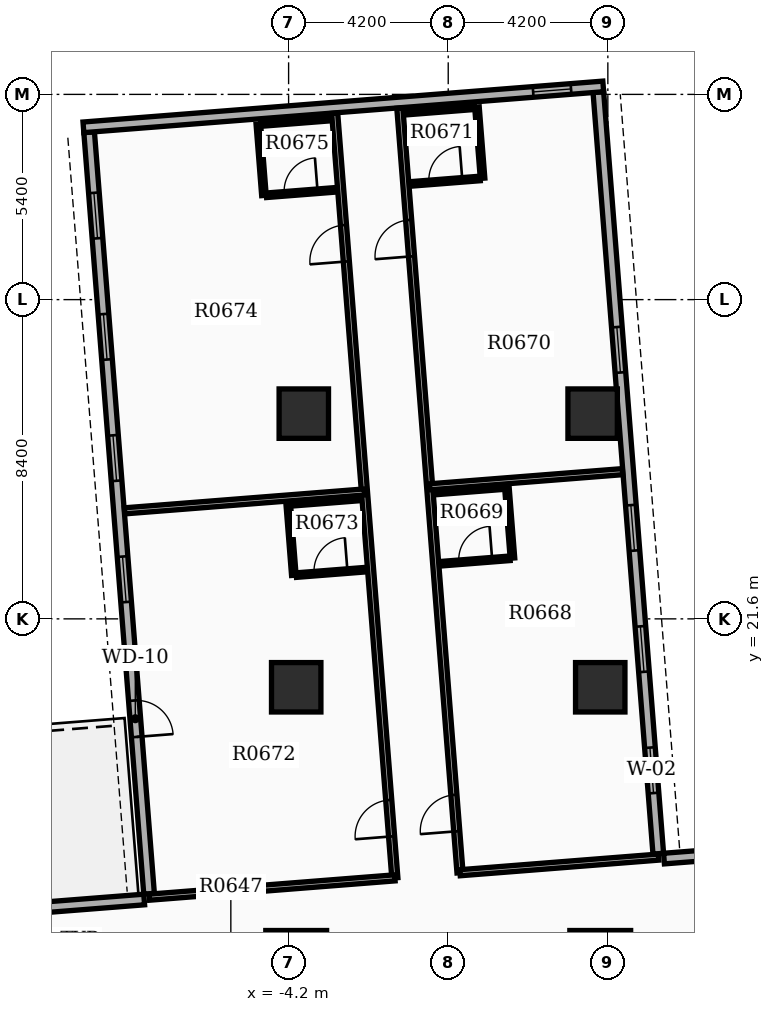
"""IFC4 building model, lengths in metres.
Left out: names, types, materials, properties, quantities, classifications, styles, units other than length and angle.
Written with IfcOpenShell. Run it as: python <this file> out.ifc"""

import sys

from ifc_helpers import new_model, si_unit, direction, frame, frame_2d, origin, origin_2d, place, context, subcontext, project, spatial, rectangle, extrude, element, fill, save


model = new_model("IFC4")
c1 = context("Model", 3, precision=1e-05, world=origin(), true_north=direction((0.0, 1.0)))
c2 = subcontext(c1, "Body", "Model", "MODEL_VIEW")
j1 = project(units=[si_unit("LENGTHUNIT", "METRE"), si_unit("PLANEANGLEUNIT", "RADIAN")], contexts=[c1])
p1 = place(None, origin())
s1 = spatial("IfcSite", under=j1, at=p1, CompositionType="ELEMENT")
p2 = place(p1, origin())
s2 = spatial("IfcBuilding", under=s1, at=p2, CompositionType="ELEMENT")
p3 = place(p2, frame((0.0, 0.0, 43.2)))
s3 = spatial("IfcBuildingStorey", under=s2, at=p3, CompositionType="ELEMENT", Elevation=43.2)
for number, where, z_axis, x_axis in (
    (1, (4.0, 12.6, 0.0), (0.0, 0.0, 1.0), (1.0, 0.0, 0.0)),
    (2, (-4.0, 12.6, 0.0), (0.0, 0.0, 1.0), (1.0, 0.0, 0.0)),
):
    element("IfcColumn", number, at=place(p3, frame(where, z_axis=z_axis, x_axis=x_axis)), inside=s3, PredefinedType="COLUMN", context=c2, shape_type="SweptSolid", body=[
        extrude(rectangle(XDim=1.6, YDim=1.6, at=origin_2d()), origin(), (0.0, 0.0, 1.0), 3.9),
    ])
for number, where, z_axis, x_axis in (
    (3, (-4.0, 19.8, 0.0), (0.0, 0.0, 1.0), (1.0, 0.0, 0.0)),
    (4, (4.0, 19.8, 0.0), (0.0, 0.0, 1.0), (1.0, 0.0, 0.0)),
    (5, (-3.8, 27.0, 0.0), (0.0, 0.0, 1.0), (1.0, 0.0, 0.0)),
    (6, (3.8, 27.0, 0.0), (0.0, 0.0, 1.0), (1.0, 0.0, 0.0)),
):
    element("IfcColumn", number, at=place(p3, frame(where, z_axis=z_axis, x_axis=x_axis)), inside=s3, PredefinedType="COLUMN", context=c2, shape_type="SweptSolid", body=[
        extrude(rectangle(XDim=1.3, YDim=1.3, at=origin_2d()), origin(), (0.0, 0.0, 1.0), 3.9),
    ])
p4 = place(p3, frame((5.527, 15.421, 0.0), z_axis=(0.0, 0.0, 1.0), x_axis=(-0.078452802979, 0.996917828963, 0.0)))
e7 = element("IfcWall", 7, at=p4, inside=s3, PredefinedType="STANDARD", context=c2, shape_type="SweptSolid", body=[
    extrude(rectangle(XDim=20.1, YDim=0.28, at=frame_2d((10.05, 0.0))), origin(), (0.0, 0.0, 1.0), 2.86),
])
p5 = place(p4, frame((1.6, 0.0, 0.8)))
e8 = element("IfcOpeningElement", 8, at=p5, cuts=e7, PredefinedType="OPENING", context=c2, shape_type="SweptSolid", body=[
    extrude(rectangle(XDim=1.2, YDim=1.6, at=frame_2d((0.6, 0.8))), frame((0.0, 0.15, 0.0), z_axis=(0.0, -1.0, 0.0), x_axis=(1.0, 0.0, 0.0)), (0.0, 0.0, 1.0), 0.3),
])
p6 = place(p4, frame((4.8, 0.0, 0.8)))
e9 = element("IfcOpeningElement", 9, at=p6, cuts=e7, PredefinedType="OPENING", context=c2, shape_type="SweptSolid", body=[
    extrude(rectangle(XDim=1.2, YDim=1.6, at=frame_2d((0.6, 0.8))), frame((0.0, 0.15, 0.0), z_axis=(0.0, -1.0, 0.0), x_axis=(1.0, 0.0, 0.0)), (0.0, 0.0, 1.0), 0.3),
])
p7 = place(p4, frame((8.0, 0.0, 0.8)))
e10 = element("IfcOpeningElement", 10, at=p7, cuts=e7, PredefinedType="OPENING", context=c2, shape_type="SweptSolid", body=[
    extrude(rectangle(XDim=1.2, YDim=1.6, at=frame_2d((0.6, 0.8))), frame((0.0, 0.15, 0.0), z_axis=(0.0, -1.0, 0.0), x_axis=(1.0, 0.0, 0.0)), (0.0, 0.0, 1.0), 0.3),
])
p8 = place(p4, frame((12.7, 0.0, 0.8)))
e11 = element("IfcOpeningElement", 11, at=p8, cuts=e7, PredefinedType="OPENING", context=c2, shape_type="SweptSolid", body=[
    extrude(rectangle(XDim=1.2, YDim=1.6, at=frame_2d((0.6, 0.8))), frame((0.0, 0.15, 0.0), z_axis=(0.0, -1.0, 0.0), x_axis=(1.0, 0.0, 0.0)), (0.0, 0.0, 1.0), 0.3),
])
p9 = place(p3, frame((-9.448, 34.405, 0.0), z_axis=(0.0, 0.0, 1.0), x_axis=(0.078452802979, -0.996917828963, 0.0)))
e12 = element("IfcWall", 12, at=p9, inside=s3, PredefinedType="STANDARD", context=c2, shape_type="SweptSolid", body=[
    extrude(rectangle(XDim=20.1, YDim=0.28, at=frame_2d((10.05, 0.0))), origin(), (0.0, 0.0, 1.0), 2.86),
])
p10 = place(p9, frame((1.6, 0.0, 0.8)))
e13 = element("IfcOpeningElement", 13, at=p10, cuts=e12, PredefinedType="OPENING", context=c2, shape_type="SweptSolid", body=[
    extrude(rectangle(XDim=1.2, YDim=1.6, at=frame_2d((0.6, 0.8))), frame((0.0, 0.15, 0.0), z_axis=(0.0, -1.0, 0.0), x_axis=(1.0, 0.0, 0.0)), (0.0, 0.0, 1.0), 0.3),
])
p11 = place(p9, frame((4.8, 0.0, 0.8)))
e14 = element("IfcOpeningElement", 14, at=p11, cuts=e12, PredefinedType="OPENING", context=c2, shape_type="SweptSolid", body=[
    extrude(rectangle(XDim=1.2, YDim=1.6, at=frame_2d((0.6, 0.8))), frame((0.0, 0.15, 0.0), z_axis=(0.0, -1.0, 0.0), x_axis=(1.0, 0.0, 0.0)), (0.0, 0.0, 1.0), 0.3),
])
p12 = place(p9, frame((8.0, 0.0, 0.8)))
e15 = element("IfcOpeningElement", 15, at=p12, cuts=e12, PredefinedType="OPENING", context=c2, shape_type="SweptSolid", body=[
    extrude(rectangle(XDim=1.2, YDim=1.6, at=frame_2d((0.6, 0.8))), frame((0.0, 0.15, 0.0), z_axis=(0.0, -1.0, 0.0), x_axis=(1.0, 0.0, 0.0)), (0.0, 0.0, 1.0), 0.3),
])
p13 = place(p9, frame((11.2, 0.0, 0.8)))
e16 = element("IfcOpeningElement", 16, at=p13, cuts=e12, PredefinedType="OPENING", context=c2, shape_type="SweptSolid", body=[
    extrude(rectangle(XDim=1.2, YDim=1.6, at=frame_2d((0.6, 0.8))), frame((0.0, 0.15, 0.0), z_axis=(0.0, -1.0, 0.0), x_axis=(1.0, 0.0, 0.0)), (0.0, 0.0, 1.0), 0.3),
])
p14 = place(p9, frame((15.0, 0.0, 0.0)))
e17 = element("IfcOpeningElement", 17, at=p14, cuts=e12, PredefinedType="OPENING", context=c2, shape_type="SweptSolid", body=[
    extrude(rectangle(XDim=0.96, YDim=2.1, at=frame_2d((0.48, 1.05))), frame((0.0, 0.15, 0.0), z_axis=(0.0, -1.0, 0.0), x_axis=(1.0, 0.0, 0.0)), (0.0, 0.0, 1.0), 0.3),
])
p15 = place(p3, frame((4.079, 35.61, 0.0), z_axis=(0.0, 0.0, 1.0), x_axis=(-0.996916198482, -0.078473519122, 0.0)))
e18 = element("IfcWall", 18, at=p15, inside=s3, PredefinedType="STANDARD", context=c2, shape_type="SweptSolid", body=[
    extrude(rectangle(XDim=13.72, YDim=0.28, at=frame_2d((6.86, 0.0))), origin(), (0.0, 0.0, 1.0), 2.86),
])
p16 = place(p15, frame((0.85, 0.0, 0.85)))
e19 = element("IfcOpeningElement", 19, at=p16, cuts=e18, PredefinedType="OPENING", context=c2, shape_type="SweptSolid", body=[
    extrude(rectangle(XDim=1.0, YDim=1.5, at=frame_2d((0.5, 0.75))), frame((0.0, 0.15, 0.0), z_axis=(0.0, -1.0, 0.0), x_axis=(1.0, 0.0, 0.0)), (0.0, 0.0, 1.0), 0.3),
])
p17 = place(p3, frame((11.958, 15.787, 0.0), z_axis=(0.0, 0.0, 1.0), x_axis=(-0.996916125428, -0.078474447191, 0.0)))
e20 = element("IfcWall", 20, at=p17, inside=s3, PredefinedType="STANDARD", context=c2, shape_type="SweptSolid", body=[
    extrude(rectangle(XDim=6.3, YDim=0.28, at=frame_2d((3.15, 0.0))), origin(), (0.0, 0.0, 1.0), 2.86),
])
p18 = place(p3, frame((-14.281, 13.722, 0.0), z_axis=(0.0, 0.0, 1.0), x_axis=(0.99691915642, 0.078435932851, 0.0)))
e21 = element("IfcWall", 21, at=p18, inside=s3, PredefinedType="STANDARD", context=c2, shape_type="SweptSolid", body=[
    extrude(rectangle(XDim=6.3, YDim=0.28, at=frame_2d((3.15, 0.0))), origin(), (0.0, 0.0, 1.0), 2.86),
])
p19 = place(p3, frame((0.31, 14.92, 0.0), z_axis=(0.0, 0.0, 1.0), x_axis=(-0.078461408156, 0.996917151738, 0.0)))
e22 = element("IfcWall", 22, at=p19, inside=s3, PredefinedType="PARTITIONING", context=c2, shape_type="SweptSolid", body=[
    extrude(rectangle(XDim=20.182, YDim=0.16, at=frame_2d((10.091, 0.0))), origin(), (0.0, 0.0, 1.0), 2.85),
])
p20 = place(p19, frame((1.094, 0.0, 0.0)))
e23 = element("IfcOpeningElement", 23, at=p20, cuts=e22, PredefinedType="OPENING", context=c2, shape_type="SweptSolid", body=[
    extrude(rectangle(XDim=0.96, YDim=2.15, at=frame_2d((0.48, 1.075))), frame((0.0, 0.09, 0.0), z_axis=(0.0, -1.0, 0.0), x_axis=(1.0, 0.0, 0.0)), (0.0, 0.0, 1.0), 0.18),
])
p21 = place(p19, frame((16.268, 0.0, 0.0)))
e24 = element("IfcOpeningElement", 24, at=p21, cuts=e22, PredefinedType="OPENING", context=c2, shape_type="SweptSolid", body=[
    extrude(rectangle(XDim=0.96, YDim=2.15, at=frame_2d((0.48, 1.075))), frame((0.0, 0.09, 0.0), z_axis=(0.0, -1.0, 0.0), x_axis=(1.0, 0.0, 0.0)), (0.0, 0.0, 1.0), 0.18),
])
p22 = place(p3, frame((0.31, 14.92, 0.0), z_axis=(0.0, 0.0, 1.0), x_axis=(0.996917262382, 0.07846000233, 0.0)))
e25 = element("IfcWall", 25, at=p22, inside=s3, PredefinedType="PARTITIONING", context=c2, shape_type="SweptSolid", body=[
    extrude(rectangle(XDim=5.24, YDim=0.16, at=frame_2d((2.62, 0.0))), origin(), (0.0, 0.0, 1.0), 2.85),
])
p23 = place(p3, frame((-0.489, 25.074, 0.0), z_axis=(0.0, 0.0, 1.0), x_axis=(0.996918705771, 0.078441660381, 0.0)))
e26 = element("IfcWall", 26, at=p23, inside=s3, PredefinedType="PARTITIONING", context=c2, shape_type="SweptSolid", body=[
    extrude(rectangle(XDim=5.092, YDim=0.16, at=frame_2d((2.546, 0.0))), origin(), (0.0, 0.0, 1.0), 2.85),
])
p24 = place(p3, frame((-0.189, 23.051, 0.0), z_axis=(0.0, 0.0, 1.0), x_axis=(0.996916400774, 0.0784709492, 0.0)))
e27 = element("IfcWall", 27, at=p24, inside=s3, PredefinedType="PARTITIONING", context=c2, shape_type="SweptSolid", body=[
    extrude(rectangle(XDim=1.82, YDim=0.12, at=frame_2d((0.91, 0.0))), origin(), (0.0, 0.0, 1.0), 2.85),
])
p25 = place(p24, frame((0.47, 0.0, 0.0)))
e28 = element("IfcOpeningElement", 28, at=p25, cuts=e27, PredefinedType="OPENING", context=c2, shape_type="SweptSolid", body=[
    extrude(rectangle(XDim=0.88, YDim=2.1, at=frame_2d((0.44, 1.05))), frame((0.0, 0.07, 0.0), z_axis=(0.0, -1.0, 0.0), x_axis=(1.0, 0.0, 0.0)), (0.0, 0.0, 1.0), 0.14),
])
p26 = place(p3, frame((-0.337, 24.925, 0.0), z_axis=(0.0, 0.0, 1.0), x_axis=(0.996916400774, 0.0784709492, 0.0)))
e29 = element("IfcWall", 29, at=p26, inside=s3, PredefinedType="PARTITIONING", context=c2, shape_type="SweptSolid", body=[
    extrude(rectangle(XDim=1.82, YDim=0.12, at=frame_2d((0.91, 0.0))), origin(), (0.0, 0.0, 1.0), 2.85),
])
p27 = place(p3, frame((1.69, 23.199, 0.0), z_axis=(0.0, 0.0, 1.0), x_axis=(-0.078444342213, 0.99691849475, 0.0)))
e30 = element("IfcWall", 30, at=p27, inside=s3, PredefinedType="PARTITIONING", context=c2, shape_type="SweptSolid", body=[
    extrude(rectangle(XDim=1.88, YDim=0.12, at=frame_2d((0.94, 0.0))), origin(), (0.0, 0.0, 1.0), 2.85),
])
p28 = place(p3, frame((-0.976, 33.045, 0.0), z_axis=(0.0, 0.0, 1.0), x_axis=(0.996926062126, 0.078348112001, 0.0)))
e31 = element("IfcWall", 31, at=p28, inside=s3, PredefinedType="PARTITIONING", context=c2, shape_type="SweptSolid", body=[
    extrude(rectangle(XDim=1.82, YDim=0.12, at=frame_2d((0.91, 0.0))), origin(), (0.0, 0.0, 1.0), 2.85),
])
p29 = place(p28, frame((0.47, 0.0, 0.0)))
e32 = element("IfcOpeningElement", 32, at=p29, cuts=e31, PredefinedType="OPENING", context=c2, shape_type="SweptSolid", body=[
    extrude(rectangle(XDim=0.88, YDim=2.1, at=frame_2d((0.44, 1.05))), frame((0.0, 0.07, 0.0), z_axis=(0.0, -1.0, 0.0), x_axis=(1.0, 0.0, 0.0)), (0.0, 0.0, 1.0), 0.14),
])
p30 = place(p3, frame((-1.123, 34.919, 0.0), z_axis=(0.0, 0.0, 1.0), x_axis=(0.996916400774, 0.0784709492, 0.0)))
e33 = element("IfcWall", 33, at=p30, inside=s3, PredefinedType="PARTITIONING", context=c2, shape_type="SweptSolid", body=[
    extrude(rectangle(XDim=1.82, YDim=0.12, at=frame_2d((0.91, 0.0))), origin(), (0.0, 0.0, 1.0), 2.85),
])
p31 = place(p3, frame((0.904, 33.193, 0.0), z_axis=(0.0, 0.0, 1.0), x_axis=(-0.07843418698, 0.996919293781, 0.0)))
e34 = element("IfcWall", 34, at=p31, inside=s3, PredefinedType="PARTITIONING", context=c2, shape_type="SweptSolid", body=[
    extrude(rectangle(XDim=1.88, YDim=0.12, at=frame_2d((0.94, 0.0))), origin(), (0.0, 0.0, 1.0), 2.85),
])
p32 = place(p3, frame((-1.404, 14.785, 0.0), z_axis=(0.0, 0.0, 1.0), x_axis=(-0.078460461943, 0.996917226209, 0.0)))
e35 = element("IfcWall", 35, at=p32, inside=s3, PredefinedType="PARTITIONING", context=c2, shape_type="SweptSolid", body=[
    extrude(rectangle(XDim=20.182, YDim=0.16, at=frame_2d((10.091, 0.0))), origin(), (0.0, 0.0, 1.0), 2.85),
])
p33 = place(p32, frame((1.094, 0.0, 0.0)))
e36 = element("IfcOpeningElement", 36, at=p33, cuts=e35, PredefinedType="OPENING", context=c2, shape_type="SweptSolid", body=[
    extrude(rectangle(XDim=0.96, YDim=2.15, at=frame_2d((0.48, 1.075))), frame((0.0, 0.09, 0.0), z_axis=(0.0, -1.0, 0.0), x_axis=(1.0, 0.0, 0.0)), (0.0, 0.0, 1.0), 0.18),
])
p34 = place(p32, frame((16.268, 0.0, 0.0)))
e37 = element("IfcOpeningElement", 37, at=p34, cuts=e35, PredefinedType="OPENING", context=c2, shape_type="SweptSolid", body=[
    extrude(rectangle(XDim=0.96, YDim=2.15, at=frame_2d((0.48, 1.075))), frame((0.0, 0.09, 0.0), z_axis=(0.0, -1.0, 0.0), x_axis=(1.0, 0.0, 0.0)), (0.0, 0.0, 1.0), 0.18),
])
p35 = place(p3, frame((-1.404, 14.785, 0.0), z_axis=(0.0, 0.0, 1.0), x_axis=(-0.996918883175, -0.07843940572, 0.0)))
e38 = element("IfcWall", 38, at=p35, inside=s3, PredefinedType="PARTITIONING", context=c2, shape_type="SweptSolid", body=[
    extrude(rectangle(XDim=6.48, YDim=0.16, at=frame_2d((3.24, 0.0))), origin(), (0.0, 0.0, 1.0), 2.85),
])
p36 = place(p3, frame((-2.204, 24.939, 0.0), z_axis=(0.0, 0.0, 1.0), x_axis=(-0.996917066323, -0.078462493424, 0.0)))
e39 = element("IfcWall", 39, at=p36, inside=s3, PredefinedType="PARTITIONING", context=c2, shape_type="SweptSolid", body=[
    extrude(rectangle(XDim=6.332, YDim=0.16, at=frame_2d((3.166, 0.0))), origin(), (0.0, 0.0, 1.0), 2.85),
])
p37 = place(p3, frame((-3.997, 22.751, 0.0), z_axis=(0.0, 0.0, 1.0), x_axis=(0.996915574626, 0.078481444107, 0.0)))
e40 = element("IfcWall", 40, at=p37, inside=s3, PredefinedType="PARTITIONING", context=c2, shape_type="SweptSolid", body=[
    extrude(rectangle(XDim=1.82, YDim=0.12, at=frame_2d((0.91, 0.0))), origin(), (0.0, 0.0, 1.0), 2.85),
])
p38 = place(p37, frame((0.47, 0.0, 0.0)))
e41 = element("IfcOpeningElement", 41, at=p38, cuts=e40, PredefinedType="OPENING", context=c2, shape_type="SweptSolid", body=[
    extrude(rectangle(XDim=0.88, YDim=2.1, at=frame_2d((0.44, 1.05))), frame((0.0, 0.07, 0.0), z_axis=(0.0, -1.0, 0.0), x_axis=(1.0, 0.0, 0.0)), (0.0, 0.0, 1.0), 0.14),
])
p39 = place(p3, frame((-4.145, 24.626, 0.0), z_axis=(0.0, 0.0, 1.0), x_axis=(0.996916400774, 0.0784709492, 0.0)))
e42 = element("IfcWall", 42, at=p39, inside=s3, PredefinedType="PARTITIONING", context=c2, shape_type="SweptSolid", body=[
    extrude(rectangle(XDim=1.82, YDim=0.12, at=frame_2d((0.91, 0.0))), origin(), (0.0, 0.0, 1.0), 2.85),
])
p40 = place(p3, frame((-4.062, 22.746, 0.0), z_axis=(0.0, 0.0, 1.0), x_axis=(-0.07843418698, 0.996919293781, 0.0)))
e43 = element("IfcWall", 43, at=p40, inside=s3, PredefinedType="PARTITIONING", context=c2, shape_type="SweptSolid", body=[
    extrude(rectangle(XDim=1.88, YDim=0.12, at=frame_2d((0.94, 0.0))), origin(), (0.0, 0.0, 1.0), 2.85),
])
p41 = place(p3, frame((-4.784, 32.746, 0.0), z_axis=(0.0, 0.0, 1.0), x_axis=(0.996916400774, 0.0784709492, 0.0)))
e44 = element("IfcWall", 44, at=p41, inside=s3, PredefinedType="PARTITIONING", context=c2, shape_type="SweptSolid", body=[
    extrude(rectangle(XDim=1.82, YDim=0.12, at=frame_2d((0.91, 0.0))), origin(), (0.0, 0.0, 1.0), 2.85),
])
p42 = place(p41, frame((0.47, 0.0, 0.0)))
e45 = element("IfcOpeningElement", 45, at=p42, cuts=e44, PredefinedType="OPENING", context=c2, shape_type="SweptSolid", body=[
    extrude(rectangle(XDim=0.88, YDim=2.1, at=frame_2d((0.44, 1.05))), frame((0.0, 0.07, 0.0), z_axis=(0.0, -1.0, 0.0), x_axis=(1.0, 0.0, 0.0)), (0.0, 0.0, 1.0), 0.14),
])
p43 = place(p3, frame((-4.931, 34.62, 0.0), z_axis=(0.0, 0.0, 1.0), x_axis=(0.996915574626, 0.078481444107, 0.0)))
e46 = element("IfcWall", 46, at=p43, inside=s3, PredefinedType="PARTITIONING", context=c2, shape_type="SweptSolid", body=[
    extrude(rectangle(XDim=1.82, YDim=0.12, at=frame_2d((0.91, 0.0))), origin(), (0.0, 0.0, 1.0), 2.85),
])
p44 = place(p3, frame((-4.849, 32.74, 0.0), z_axis=(0.0, 0.0, 1.0), x_axis=(-0.07843418698, 0.996919293781, 0.0)))
e47 = element("IfcWall", 47, at=p44, inside=s3, PredefinedType="PARTITIONING", context=c2, shape_type="SweptSolid", body=[
    extrude(rectangle(XDim=1.88, YDim=0.12, at=frame_2d((0.94, 0.0))), origin(), (0.0, 0.0, 1.0), 2.85),
])
p45 = place(p5, origin())
e48 = element("IfcWindow", 48, at=p45, inside=s3, PartitioningType="SINGLE_PANEL", PredefinedType="WINDOW", context=c2, shape_type="SweptSolid", body=[
    extrude(rectangle(XDim=1.2, YDim=1.6, at=frame_2d((0.6, 0.8))), frame((0.0, 0.03, 0.0), z_axis=(0.0, -1.0, 0.0), x_axis=(1.0, 0.0, 0.0)), (0.0, 0.0, 1.0), 0.06),
])
fill(e8, e48)
p46 = place(p6, origin())
e49 = element("IfcWindow", 49, at=p46, inside=s3, PartitioningType="SINGLE_PANEL", PredefinedType="WINDOW", context=c2, shape_type="SweptSolid", body=[
    extrude(rectangle(XDim=1.2, YDim=1.6, at=frame_2d((0.6, 0.8))), frame((0.0, 0.03, 0.0), z_axis=(0.0, -1.0, 0.0), x_axis=(1.0, 0.0, 0.0)), (0.0, 0.0, 1.0), 0.06),
])
fill(e9, e49)
p47 = place(p7, origin())
e50 = element("IfcWindow", 50, at=p47, inside=s3, PartitioningType="SINGLE_PANEL", PredefinedType="WINDOW", context=c2, shape_type="SweptSolid", body=[
    extrude(rectangle(XDim=1.2, YDim=1.6, at=frame_2d((0.6, 0.8))), frame((0.0, 0.03, 0.0), z_axis=(0.0, -1.0, 0.0), x_axis=(1.0, 0.0, 0.0)), (0.0, 0.0, 1.0), 0.06),
])
fill(e10, e50)
p48 = place(p8, origin())
e51 = element("IfcWindow", 51, at=p48, inside=s3, PartitioningType="SINGLE_PANEL", PredefinedType="WINDOW", context=c2, shape_type="SweptSolid", body=[
    extrude(rectangle(XDim=1.2, YDim=1.6, at=frame_2d((0.6, 0.8))), frame((0.0, 0.03, 0.0), z_axis=(0.0, -1.0, 0.0), x_axis=(1.0, 0.0, 0.0)), (0.0, 0.0, 1.0), 0.06),
])
fill(e11, e51)
p49 = place(p10, origin())
e52 = element("IfcWindow", 52, at=p49, inside=s3, PartitioningType="SINGLE_PANEL", PredefinedType="WINDOW", context=c2, shape_type="SweptSolid", body=[
    extrude(rectangle(XDim=1.2, YDim=1.6, at=frame_2d((0.6, 0.8))), frame((0.0, 0.03, 0.0), z_axis=(0.0, -1.0, 0.0), x_axis=(1.0, 0.0, 0.0)), (0.0, 0.0, 1.0), 0.06),
])
fill(e13, e52)
p50 = place(p11, origin())
e53 = element("IfcWindow", 53, at=p50, inside=s3, PartitioningType="SINGLE_PANEL", PredefinedType="WINDOW", context=c2, shape_type="SweptSolid", body=[
    extrude(rectangle(XDim=1.2, YDim=1.6, at=frame_2d((0.6, 0.8))), frame((0.0, 0.03, 0.0), z_axis=(0.0, -1.0, 0.0), x_axis=(1.0, 0.0, 0.0)), (0.0, 0.0, 1.0), 0.06),
])
fill(e14, e53)
p51 = place(p12, origin())
e54 = element("IfcWindow", 54, at=p51, inside=s3, PartitioningType="SINGLE_PANEL", PredefinedType="WINDOW", context=c2, shape_type="SweptSolid", body=[
    extrude(rectangle(XDim=1.2, YDim=1.6, at=frame_2d((0.6, 0.8))), frame((0.0, 0.03, 0.0), z_axis=(0.0, -1.0, 0.0), x_axis=(1.0, 0.0, 0.0)), (0.0, 0.0, 1.0), 0.06),
])
fill(e15, e54)
p52 = place(p13, origin())
e55 = element("IfcWindow", 55, at=p52, inside=s3, PartitioningType="SINGLE_PANEL", PredefinedType="WINDOW", context=c2, shape_type="SweptSolid", body=[
    extrude(rectangle(XDim=1.2, YDim=1.6, at=frame_2d((0.6, 0.8))), frame((0.0, 0.03, 0.0), z_axis=(0.0, -1.0, 0.0), x_axis=(1.0, 0.0, 0.0)), (0.0, 0.0, 1.0), 0.06),
])
fill(e16, e55)
p53 = place(p16, origin())
e56 = element("IfcWindow", 56, at=p53, inside=s3, PartitioningType="SINGLE_PANEL", PredefinedType="WINDOW", context=c2, shape_type="SweptSolid", body=[
    extrude(rectangle(XDim=1.0, YDim=1.5, at=frame_2d((0.5, 0.75))), frame((0.0, 0.03, 0.0), z_axis=(0.0, -1.0, 0.0), x_axis=(1.0, 0.0, 0.0)), (0.0, 0.0, 1.0), 0.06),
])
fill(e19, e56)
p54 = place(p14, origin())
e57 = element("IfcDoor", 57, at=p54, inside=s3, OperationType="SINGLE_SWING_RIGHT", PredefinedType="DOOR", context=c2, shape_type="SweptSolid", body=[
    extrude(rectangle(XDim=0.96, YDim=2.1, at=frame_2d((0.48, 1.05))), frame((0.0, 0.025, 0.0), z_axis=(0.0, -1.0, 0.0), x_axis=(1.0, 0.0, 0.0)), (0.0, 0.0, 1.0), 0.05),
])
fill(e17, e57)
p55 = place(p20, origin())
e58 = element("IfcDoor", 58, at=p55, inside=s3, OperationType="SINGLE_SWING_LEFT", PredefinedType="DOOR", context=c2, shape_type="SweptSolid", body=[
    extrude(rectangle(XDim=0.96, YDim=2.15, at=frame_2d((0.48, 1.075))), frame((0.0, 0.025, 0.0), z_axis=(0.0, -1.0, 0.0), x_axis=(1.0, 0.0, 0.0)), (0.0, 0.0, 1.0), 0.05),
])
fill(e23, e58)
p56 = place(p25, origin())
e59 = element("IfcDoor", 59, at=p56, inside=s3, OperationType="SINGLE_SWING_RIGHT", PredefinedType="DOOR", context=c2, shape_type="SweptSolid", body=[
    extrude(rectangle(XDim=0.88, YDim=2.1, at=frame_2d((0.44, 1.05))), frame((0.0, 0.025, 0.0), z_axis=(0.0, -1.0, 0.0), x_axis=(1.0, 0.0, 0.0)), (0.0, 0.0, 1.0), 0.05),
])
fill(e28, e59)
p57 = place(p21, origin())
e60 = element("IfcDoor", 60, at=p57, inside=s3, OperationType="SINGLE_SWING_LEFT", PredefinedType="DOOR", context=c2, shape_type="SweptSolid", body=[
    extrude(rectangle(XDim=0.96, YDim=2.15, at=frame_2d((0.48, 1.075))), frame((0.0, 0.025, 0.0), z_axis=(0.0, -1.0, 0.0), x_axis=(1.0, 0.0, 0.0)), (0.0, 0.0, 1.0), 0.05),
])
fill(e24, e60)
p58 = place(p29, origin())
e61 = element("IfcDoor", 61, at=p58, inside=s3, OperationType="SINGLE_SWING_RIGHT", PredefinedType="DOOR", context=c2, shape_type="SweptSolid", body=[
    extrude(rectangle(XDim=0.88, YDim=2.1, at=frame_2d((0.44, 1.05))), frame((0.0, 0.025, 0.0), z_axis=(0.0, -1.0, 0.0), x_axis=(1.0, 0.0, 0.0)), (0.0, 0.0, 1.0), 0.05),
])
fill(e32, e61)
p59 = place(p33, origin())
e62 = element("IfcDoor", 62, at=p59, inside=s3, OperationType="SINGLE_SWING_LEFT", PredefinedType="DOOR", context=c2, shape_type="SweptSolid", body=[
    extrude(rectangle(XDim=0.96, YDim=2.15, at=frame_2d((0.48, 1.075))), frame((0.0, 0.025, 0.0), z_axis=(0.0, -1.0, 0.0), x_axis=(1.0, 0.0, 0.0)), (0.0, 0.0, 1.0), 0.05),
])
fill(e36, e62)
p60 = place(p38, origin())
e63 = element("IfcDoor", 63, at=p60, inside=s3, OperationType="SINGLE_SWING_RIGHT", PredefinedType="DOOR", context=c2, shape_type="SweptSolid", body=[
    extrude(rectangle(XDim=0.88, YDim=2.1, at=frame_2d((0.44, 1.05))), frame((0.0, 0.025, 0.0), z_axis=(0.0, -1.0, 0.0), x_axis=(1.0, 0.0, 0.0)), (0.0, 0.0, 1.0), 0.05),
])
fill(e41, e63)
p61 = place(p34, origin())
e64 = element("IfcDoor", 64, at=p61, inside=s3, OperationType="SINGLE_SWING_LEFT", PredefinedType="DOOR", context=c2, shape_type="SweptSolid", body=[
    extrude(rectangle(XDim=0.96, YDim=2.15, at=frame_2d((0.48, 1.075))), frame((0.0, 0.025, 0.0), z_axis=(0.0, -1.0, 0.0), x_axis=(1.0, 0.0, 0.0)), (0.0, 0.0, 1.0), 0.05),
])
fill(e37, e64)
p62 = place(p42, origin())
e65 = element("IfcDoor", 65, at=p62, inside=s3, OperationType="SINGLE_SWING_RIGHT", PredefinedType="DOOR", context=c2, shape_type="SweptSolid", body=[
    extrude(rectangle(XDim=0.88, YDim=2.1, at=frame_2d((0.44, 1.05))), frame((0.0, 0.025, 0.0), z_axis=(0.0, -1.0, 0.0), x_axis=(1.0, 0.0, 0.0)), (0.0, 0.0, 1.0), 0.05),
])
fill(e45, e65)
save(model, sys.argv[1])
